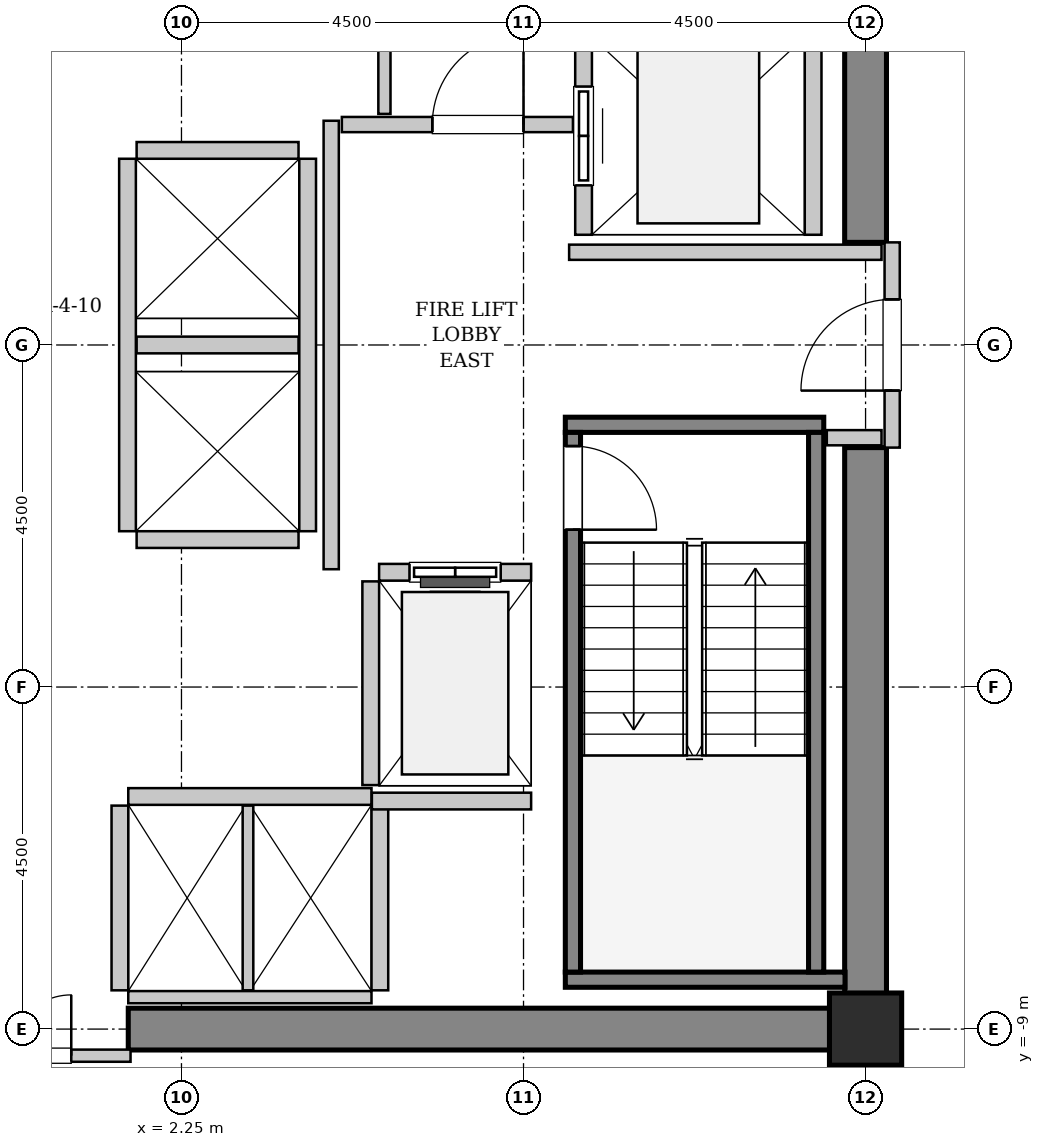
"""IFC4 building model, lengths in metres.
Left out: names, types, materials, properties, quantities, classifications, styles, units other than length and angle.
Written with IfcOpenShell. Run it as: python <this file> out.ifc"""

import sys

from ifc_helpers import new_model, si_unit, direction, frame, frame_2d, origin, origin_2d, place, context, subcontext, project, spatial, rectangle, hollow_rectangle, extrude, source, transform, mapped, element, fill, save


model = new_model("IFC4")
c1 = context("Model", 3, precision=1e-05, world=origin(), true_north=direction((0.0, 1.0)))
c2 = subcontext(c1, "Body", "Model", "MODEL_VIEW")
j1 = project(units=[si_unit("LENGTHUNIT", "METRE"), si_unit("PLANEANGLEUNIT", "RADIAN")], contexts=[c1])
p1 = place(None, origin())
s1 = spatial("IfcSite", under=j1, at=p1, CompositionType="ELEMENT")
p2 = place(p1, origin())
s2 = spatial("IfcBuilding", under=s1, at=p2, CompositionType="ELEMENT")
p3 = place(p2, frame((0.0, 0.0, 98.4)))
s3 = spatial("IfcBuildingStorey", under=s2, at=p3, CompositionType="ELEMENT", Elevation=98.4)
m1 = source(origin(), c2, "Body", "SweptSolid", [
    extrude(rectangle(XDim=9.975, YDim=0.55, at=frame_2d((4.987, 0.0))), origin(), (0.0, 0.0, 1.0), 3.8),
])
p4 = place(p3, frame((1.55, -9.0, 0.0), z_axis=(0.0, 0.0, 1.0), x_axis=(1.0, 0.0, 0.0)))
e1 = element("IfcWall", 1, at=p4, inside=s3, PredefinedType="SHEAR", context=c2, shape_type="MappedRepresentation", body=[
    mapped(m1, transform((0.0, 0.0, 0.0), x_axis=(1.0, 0.0, 0.0), y_axis=(0.0, 1.0, 0.0), z_axis=(0.0, 0.0, 1.0), scale=1.0)),
])
m2 = source(origin(), c2, "Body", "SweptSolid", [
    extrude(rectangle(XDim=7.375, YDim=0.55, at=frame_2d((3.688, 0.0))), origin(), (0.0, 0.0, 1.0), 3.8),
])
for number, where, z_axis, x_axis in (
    (2, (11.25, -8.725, 0.0), (0.0, 0.0, 1.0), (0.0, 1.0, 0.0)),
    (3, (11.25, 1.35, 0.0), (0.0, 0.0, 1.0), (0.0, 1.0, 0.0)),
):
    element("IfcWall", number, at=place(p3, frame(where, z_axis=z_axis, x_axis=x_axis)), inside=s3, PredefinedType="SHEAR", context=c2, shape_type="MappedRepresentation", body=[
        mapped(m2, transform((0.0, 0.0, 0.0), x_axis=(1.0, 0.0, 0.0), y_axis=(0.0, 1.0, 0.0), z_axis=(0.0, 0.0, 1.0), scale=1.0)),
    ])
m3 = source(origin(), c2, "Body", "SweptSolid", [
    extrude(hollow_rectangle(XDim=0.95, YDim=0.95, WallThickness=0.045, InnerFilletRadius=0.045, OuterFilletRadius=0.09, at=origin_2d()), origin(), (0.0, 0.0, 1.0), 3.8),
])
p5 = place(p3, frame((11.25, -9.0, 0.0), z_axis=(0.0, 0.0, 1.0), x_axis=(1.0, 0.0, 0.0)))
e4 = element("IfcColumn", 4, at=p5, inside=s3, PredefinedType="COLUMN", context=c2, shape_type="MappedRepresentation", body=[
    mapped(m3, transform((0.0, 0.0, 0.0), x_axis=(1.0, 0.0, 0.0), y_axis=(0.0, 1.0, 0.0), z_axis=(0.0, 0.0, 1.0), scale=1.0)),
])
m4 = source(origin(), c2, "Body", "SweptSolid", [
    extrude(rectangle(XDim=3.4, YDim=0.2, at=frame_2d((1.7, 0.0))), origin(), (0.0, 0.0, 1.0), 3.8),
])
p6 = place(p3, frame((7.3, -1.05, 0.0), z_axis=(0.0, 0.0, 1.0), x_axis=(1.0, 0.0, 0.0)))
e5 = element("IfcWall", 5, at=p6, inside=s3, PredefinedType="SOLIDWALL", context=c2, shape_type="MappedRepresentation", body=[
    mapped(m4, transform((0.0, 0.0, 0.0), x_axis=(1.0, 0.0, 0.0), y_axis=(0.0, 1.0, 0.0), z_axis=(0.0, 0.0, 1.0), scale=1.0)),
])
m5 = source(origin(), c2, "Body", "SweptSolid", [
    extrude(rectangle(XDim=3.68, YDim=0.2, at=frame_2d((1.84, 0.0))), origin(), (0.0, 0.0, 1.0), 3.8),
])
p7 = place(p3, frame((7.3, -8.35, 0.0), z_axis=(0.0, 0.0, 1.0), x_axis=(1.0, 0.0, 0.0)))
e6 = element("IfcWall", 6, at=p7, inside=s3, PredefinedType="SOLIDWALL", context=c2, shape_type="MappedRepresentation", body=[
    mapped(m5, transform((0.0, 0.0, 0.0), x_axis=(1.0, 0.0, 0.0), y_axis=(0.0, 1.0, 0.0), z_axis=(0.0, 0.0, 1.0), scale=1.0)),
])
m6 = source(origin(), c2, "Body", "SweptSolid", [
    extrude(rectangle(XDim=7.1, YDim=0.2, at=frame_2d((3.55, 0.0))), origin(), (0.0, 0.0, 1.0), 3.8),
])
p8 = place(p3, frame((7.4, -1.15, 0.0), z_axis=(0.0, 0.0, 1.0), x_axis=(0.0, -1.0, 0.0)))
e7 = element("IfcWall", 7, at=p8, inside=s3, PredefinedType="SOLIDWALL", context=c2, shape_type="MappedRepresentation", body=[
    mapped(m6, transform((0.0, 0.0, 0.0), x_axis=(1.0, 0.0, 0.0), y_axis=(0.0, 1.0, 0.0), z_axis=(0.0, 0.0, 1.0), scale=1.0)),
])
p9 = place(p8, frame((0.18, 0.0, 0.0)))
e8 = element("IfcOpeningElement", 8, at=p9, cuts=e7, PredefinedType="OPENING", context=c2, shape_type="SweptSolid", body=[
    extrude(rectangle(XDim=1.1, YDim=2.15, at=frame_2d((0.55, 1.075))), frame((0.0, 0.11, 0.0), z_axis=(0.0, -1.0, 0.0), x_axis=(1.0, 0.0, 0.0)), (0.0, 0.0, 1.0), 0.22),
])
p10 = place(p3, frame((10.6, -1.15, 0.0), z_axis=(0.0, 0.0, 1.0), x_axis=(0.0, -1.0, 0.0)))
e9 = element("IfcWall", 9, at=p10, inside=s3, PredefinedType="SOLIDWALL", context=c2, shape_type="MappedRepresentation", body=[
    mapped(m6, transform((0.0, 0.0, 0.0), x_axis=(1.0, 0.0, 0.0), y_axis=(0.0, 1.0, 0.0), z_axis=(0.0, 0.0, 1.0), scale=1.0)),
])
m7 = source(origin(), c2, "Body", "SweptSolid", [
    extrude(rectangle(XDim=2.0, YDim=0.22, at=frame_2d((1.0, 0.0))), origin(), (0.0, 0.0, 1.0), 3.535),
])
p11 = place(p3, frame((6.85, -2.99, 0.0), z_axis=(0.0, 0.0, 1.0), x_axis=(-1.0, 0.0, 0.0)))
e10 = element("IfcWall", 10, at=p11, inside=s3, PredefinedType="SOLIDWALL", context=c2, shape_type="MappedRepresentation", body=[
    mapped(m7, transform((0.0, 0.0, 0.0), x_axis=(1.0, 0.0, 0.0), y_axis=(0.0, 1.0, 0.0), z_axis=(0.0, 0.0, 1.0), scale=1.0)),
])
p12 = place(p11, frame((0.4, 0.0, 0.0)))
e11 = element("IfcOpeningElement", 11, at=p12, cuts=e10, PredefinedType="OPENING", context=c2, shape_type="SweptSolid", body=[
    extrude(rectangle(XDim=1.2, YDim=2.2, at=frame_2d((0.6, 1.1))), frame((0.0, 0.12, 0.0), z_axis=(0.0, -1.0, 0.0), x_axis=(1.0, 0.0, 0.0)), (0.0, 0.0, 1.0), 0.24),
])
m8 = source(origin(), c2, "Body", "SweptSolid", [
    extrude(rectangle(XDim=2.68, YDim=0.22, at=frame_2d((1.34, 0.0))), origin(), (0.0, 0.0, 1.0), 3.535),
])
p13 = place(p3, frame((4.74, -3.11, 0.0), z_axis=(0.0, 0.0, 1.0), x_axis=(0.0, -1.0, 0.0)))
e12 = element("IfcWall", 12, at=p13, inside=s3, PredefinedType="SOLIDWALL", context=c2, shape_type="MappedRepresentation", body=[
    mapped(m8, transform((0.0, 0.0, 0.0), x_axis=(1.0, 0.0, 0.0), y_axis=(0.0, 1.0, 0.0), z_axis=(0.0, 0.0, 1.0), scale=1.0)),
])
m9 = source(origin(), c2, "Body", "SweptSolid", [
    extrude(rectangle(XDim=5.45, YDim=0.22, at=frame_2d((2.725, 0.0))), origin(), (0.0, 0.0, 1.0), 3.535),
])
p14 = place(p3, frame((7.54, 6.9, 0.0), z_axis=(0.0, 0.0, 1.0), x_axis=(0.0, -1.0, 0.0)))
e13 = element("IfcWall", 13, at=p14, inside=s3, PredefinedType="SOLIDWALL", context=c2, shape_type="MappedRepresentation", body=[
    mapped(m9, transform((0.0, 0.0, 0.0), x_axis=(1.0, 0.0, 0.0), y_axis=(0.0, 1.0, 0.0), z_axis=(0.0, 0.0, 1.0), scale=1.0)),
])
p15 = place(p14, frame((3.5, 0.0, 0.0)))
e14 = element("IfcOpeningElement", 14, at=p15, cuts=e13, PredefinedType="OPENING", context=c2, shape_type="SweptSolid", body=[
    extrude(rectangle(XDim=1.3, YDim=2.3, at=frame_2d((0.65, 1.15))), frame((0.0, 0.12, 0.0), z_axis=(0.0, -1.0, 0.0), x_axis=(1.0, 0.0, 0.0)), (0.0, 0.0, 1.0), 0.24),
])
p16 = place(p14, frame((0.65, 0.0, 0.0)))
e15 = element("IfcOpeningElement", 15, at=p16, cuts=e13, PredefinedType="OPENING", context=c2, shape_type="SweptSolid", body=[
    extrude(rectangle(XDim=1.3, YDim=2.3, at=frame_2d((0.65, 1.15))), frame((0.0, 0.12, 0.0), z_axis=(0.0, -1.0, 0.0), x_axis=(1.0, 0.0, 0.0)), (0.0, 0.0, 1.0), 0.24),
])
p17 = place(p3, frame((10.56, 1.45, 0.0), z_axis=(0.0, 0.0, 1.0), x_axis=(0.0, 1.0, 0.0)))
e16 = element("IfcWall", 16, at=p17, inside=s3, PredefinedType="SOLIDWALL", context=c2, shape_type="MappedRepresentation", body=[
    mapped(m9, transform((0.0, 0.0, 0.0), x_axis=(1.0, 0.0, 0.0), y_axis=(0.0, 1.0, 0.0), z_axis=(0.0, 0.0, 1.0), scale=1.0)),
])
m10 = source(origin(), c2, "Body", "SweptSolid", [
    extrude(rectangle(XDim=3.2, YDim=0.22, at=frame_2d((1.6, 0.0))), origin(), (0.0, 0.0, 1.0), 3.535),
])
p18 = place(p3, frame((4.75, -5.94, 0.0), z_axis=(0.0, 0.0, 1.0), x_axis=(-1.0, 0.0, 0.0)))
e17 = element("IfcWall", 17, at=p18, inside=s3, PredefinedType="SOLIDWALL", context=c2, shape_type="MappedRepresentation", body=[
    mapped(m10, transform((0.0, 0.0, 0.0), x_axis=(1.0, 0.0, 0.0), y_axis=(0.0, 1.0, 0.0), z_axis=(0.0, 0.0, 1.0), scale=1.0)),
])
m11 = source(origin(), c2, "Body", "SweptSolid", [
    extrude(rectangle(XDim=3.2, YDim=0.16, at=frame_2d((1.6, 0.0))), origin(), (0.0, 0.0, 1.0), 2.425),
])
p19 = place(p3, frame((1.55, -8.58, 0.0), z_axis=(0.0, 0.0, 1.0), x_axis=(1.0, 0.0, 0.0)))
e18 = element("IfcWall", 18, at=p19, inside=s3, PredefinedType="PARTITIONING", context=c2, shape_type="MappedRepresentation", body=[
    mapped(m11, transform((0.0, 0.0, 0.0), x_axis=(1.0, 0.0, 0.0), y_axis=(0.0, 1.0, 0.0), z_axis=(0.0, 0.0, 1.0), scale=1.0)),
])
m12 = source(origin(), c2, "Body", "SweptSolid", [
    extrude(rectangle(XDim=2.43, YDim=0.22, at=frame_2d((1.215, 0.0))), origin(), (0.0, 0.0, 1.0), 3.535),
])
p20 = place(p3, frame((1.44, -6.06, 0.0), z_axis=(0.0, 0.0, 1.0), x_axis=(0.0, -1.0, 0.0)))
e19 = element("IfcWall", 19, at=p20, inside=s3, PredefinedType="SOLIDWALL", context=c2, shape_type="MappedRepresentation", body=[
    mapped(m12, transform((0.0, 0.0, 0.0), x_axis=(1.0, 0.0, 0.0), y_axis=(0.0, 1.0, 0.0), z_axis=(0.0, 0.0, 1.0), scale=1.0)),
])
m13 = source(origin(), c2, "Body", "SweptSolid", [
    extrude(rectangle(XDim=2.43, YDim=0.14, at=frame_2d((1.215, 0.0))), origin(), (0.0, 0.0, 1.0), 3.535),
])
p21 = place(p3, frame((3.125, -8.49, 0.0), z_axis=(0.0, 0.0, 1.0), x_axis=(0.0, 1.0, 0.0)))
e20 = element("IfcWall", 20, at=p21, inside=s3, PredefinedType="PARTITIONING", context=c2, shape_type="MappedRepresentation", body=[
    mapped(m13, transform((0.0, 0.0, 0.0), x_axis=(1.0, 0.0, 0.0), y_axis=(0.0, 1.0, 0.0), z_axis=(0.0, 0.0, 1.0), scale=1.0)),
])
p22 = place(p3, frame((4.86, -8.49, 0.0), z_axis=(0.0, 0.0, 1.0), x_axis=(0.0, 1.0, 0.0)))
e21 = element("IfcWall", 21, at=p22, inside=s3, PredefinedType="SOLIDWALL", context=c2, shape_type="MappedRepresentation", body=[
    mapped(m12, transform((0.0, 0.0, 0.0), x_axis=(1.0, 0.0, 0.0), y_axis=(0.0, 1.0, 0.0), z_axis=(0.0, 0.0, 1.0), scale=1.0)),
])
m14 = source(origin(), c2, "Body", "SweptSolid", [
    extrude(rectangle(XDim=4.9, YDim=0.22, at=frame_2d((2.45, 0.0))), origin(), (0.0, 0.0, 1.0), 3.535),
])
for number, where, z_axis, x_axis in (
    (22, (1.54, 2.45, 0.0), (0.0, 0.0, 1.0), (0.0, -1.0, 0.0)),
    (23, (3.91, -2.45, 0.0), (0.0, 0.0, 1.0), (0.0, 1.0, 0.0)),
):
    element("IfcWall", number, at=place(p3, frame(where, z_axis=z_axis, x_axis=x_axis)), inside=s3, PredefinedType="SOLIDWALL", context=c2, shape_type="MappedRepresentation", body=[
        mapped(m14, transform((0.0, 0.0, 0.0), x_axis=(1.0, 0.0, 0.0), y_axis=(0.0, 1.0, 0.0), z_axis=(0.0, 0.0, 1.0), scale=1.0)),
    ])
m15 = source(origin(), c2, "Body", "SweptSolid", [
    extrude(rectangle(XDim=2.13, YDim=0.22, at=frame_2d((1.065, 0.0))), origin(), (0.0, 0.0, 1.0), 3.535),
])
for number, where, z_axis, x_axis in (
    (24, (1.66, -2.56, 0.0), (0.0, 0.0, 1.0), (1.0, 0.0, 0.0)),
    (25, (1.66, 0.0, 0.0), (0.0, 0.0, 1.0), (1.0, 0.0, 0.0)),
    (26, (3.79, 2.56, 0.0), (0.0, 0.0, 1.0), (-1.0, 0.0, 0.0)),
):
    element("IfcWall", number, at=place(p3, frame(where, z_axis=z_axis, x_axis=x_axis)), inside=s3, PredefinedType="SOLIDWALL", context=c2, shape_type="MappedRepresentation", body=[
        mapped(m15, transform((0.0, 0.0, 0.0), x_axis=(1.0, 0.0, 0.0), y_axis=(0.0, 1.0, 0.0), z_axis=(0.0, 0.0, 1.0), scale=1.0)),
    ])
m16 = source(origin(), c2, "Body", "SweptSolid", [
    extrude(rectangle(XDim=2.095, YDim=0.22, at=frame_2d((1.048, 0.0))), origin(), (0.0, 0.0, 1.0), 3.535),
])
p23 = place(p3, frame((4.755, -6.0, 0.0), z_axis=(0.0, 0.0, 1.0), x_axis=(1.0, 0.0, 0.0)))
e27 = element("IfcWall", 27, at=p23, inside=s3, PredefinedType="SOLIDWALL", context=c2, shape_type="MappedRepresentation", body=[
    mapped(m16, transform((0.0, 0.0, 0.0), x_axis=(1.0, 0.0, 0.0), y_axis=(0.0, 1.0, 0.0), z_axis=(0.0, 0.0, 1.0), scale=1.0)),
])
m17 = source(origin(), c2, "Body", "SweptSolid", [
    extrude(rectangle(XDim=2.7, YDim=0.2, at=frame_2d((1.35, 0.0))), origin(), (0.0, 0.0, 1.0), 2.425),
])
p24 = place(p3, frame((11.6, -1.35, 0.0), z_axis=(0.0, 0.0, 1.0), x_axis=(0.0, 1.0, 0.0)))
e28 = element("IfcWall", 28, at=p24, inside=s3, PredefinedType="PARTITIONING", context=c2, shape_type="MappedRepresentation", body=[
    mapped(m17, transform((0.0, 0.0, 0.0), x_axis=(1.0, 0.0, 0.0), y_axis=(0.0, 1.0, 0.0), z_axis=(0.0, 0.0, 1.0), scale=1.0)),
])
p25 = place(p24, frame((0.75, 0.0, 0.0)))
e29 = element("IfcOpeningElement", 29, at=p25, cuts=e28, PredefinedType="OPENING", context=c2, shape_type="SweptSolid", body=[
    extrude(rectangle(XDim=1.2, YDim=2.15, at=frame_2d((0.6, 1.075))), frame((0.0, 0.11, 0.0), z_axis=(0.0, -1.0, 0.0), x_axis=(1.0, 0.0, 0.0)), (0.0, 0.0, 1.0), 0.22),
])
m18 = source(origin(), c2, "Body", "SweptSolid", [
    extrude(rectangle(XDim=5.9, YDim=0.2, at=frame_2d((2.95, 0.0))), origin(), (0.0, 0.0, 1.0), 3.535),
])
p26 = place(p3, frame((4.22, -2.95, 0.0), z_axis=(0.0, 0.0, 1.0), x_axis=(0.0, 1.0, 0.0)))
e30 = element("IfcWall", 30, at=p26, inside=s3, PredefinedType="PARTITIONING", context=c2, shape_type="MappedRepresentation", body=[
    mapped(m18, transform((0.0, 0.0, 0.0), x_axis=(1.0, 0.0, 0.0), y_axis=(0.0, 1.0, 0.0), z_axis=(0.0, 0.0, 1.0), scale=1.0)),
])
m19 = source(origin(), c2, "Body", "SweptSolid", [
    extrude(rectangle(XDim=3.04, YDim=0.2, at=frame_2d((1.52, 0.0))), origin(), (0.0, 0.0, 1.0), 3.535),
])
p27 = place(p3, frame((4.36, 2.9, 0.0), z_axis=(0.0, 0.0, 1.0), x_axis=(1.0, 0.0, 0.0)))
e31 = element("IfcWall", 31, at=p27, inside=s3, PredefinedType="PARTITIONING", context=c2, shape_type="MappedRepresentation", body=[
    mapped(m19, transform((0.0, 0.0, 0.0), x_axis=(1.0, 0.0, 0.0), y_axis=(0.0, 1.0, 0.0), z_axis=(0.0, 0.0, 1.0), scale=1.0)),
])
p28 = place(p27, frame((1.19, 0.0, 0.0)))
e32 = element("IfcOpeningElement", 32, at=p28, cuts=e31, PredefinedType="OPENING", context=c2, shape_type="SweptSolid", body=[
    extrude(rectangle(XDim=1.2, YDim=2.15, at=frame_2d((0.6, 1.075))), frame((0.0, 0.11, 0.0), z_axis=(0.0, -1.0, 0.0), x_axis=(1.0, 0.0, 0.0)), (0.0, 0.0, 1.0), 0.22),
])
m20 = source(origin(), c2, "Body", "SweptSolid", [
    extrude(rectangle(XDim=4.11, YDim=0.2, at=frame_2d((2.055, 0.0))), origin(), (0.0, 0.0, 1.0), 3.535),
])
p29 = place(p3, frame((7.35, 1.22, 0.0), z_axis=(0.0, 0.0, 1.0), x_axis=(1.0, 0.0, 0.0)))
e33 = element("IfcWall", 33, at=p29, inside=s3, PredefinedType="PARTITIONING", context=c2, shape_type="MappedRepresentation", body=[
    mapped(m20, transform((0.0, 0.0, 0.0), x_axis=(1.0, 0.0, 0.0), y_axis=(0.0, 1.0, 0.0), z_axis=(0.0, 0.0, 1.0), scale=1.0)),
])
m21 = source(origin(), c2, "Body", "SweptSolid", [
    extrude(rectangle(XDim=0.72, YDim=0.2, at=frame_2d((0.36, 0.0))), origin(), (0.0, 0.0, 1.0), 3.535),
])
p30 = place(p3, frame((10.74, -1.22, 0.0), z_axis=(0.0, 0.0, 1.0), x_axis=(1.0, 0.0, 0.0)))
e34 = element("IfcWall", 34, at=p30, inside=s3, PredefinedType="PARTITIONING", context=c2, shape_type="MappedRepresentation", body=[
    mapped(m21, transform((0.0, 0.0, 0.0), x_axis=(1.0, 0.0, 0.0), y_axis=(0.0, 1.0, 0.0), z_axis=(0.0, 0.0, 1.0), scale=1.0)),
])
m22 = source(origin(), c2, "Body", "SweptSolid", [
    extrude(rectangle(XDim=3.16, YDim=0.16, at=frame_2d((1.58, 0.0))), origin(), (0.0, 0.0, 1.0), 2.425),
])
p31 = place(p3, frame((-1.58, -9.35, 0.0), z_axis=(0.0, 0.0, 1.0), x_axis=(1.0, 0.0, 0.0)))
e35 = element("IfcWall", 35, at=p31, inside=s3, PredefinedType="PARTITIONING", context=c2, shape_type="MappedRepresentation", body=[
    mapped(m22, transform((0.0, 0.0, 0.0), x_axis=(1.0, 0.0, 0.0), y_axis=(0.0, 1.0, 0.0), z_axis=(0.0, 0.0, 1.0), scale=1.0)),
])
p32 = place(p31, frame((0.78, 0.0, 0.0)))
e36 = element("IfcOpeningElement", 36, at=p32, cuts=e35, PredefinedType="OPENING", context=c2, shape_type="SweptSolid", body=[
    extrude(rectangle(XDim=1.6, YDim=2.3, at=frame_2d((0.8, 1.15))), frame((0.0, 0.09, 0.0), z_axis=(0.0, -1.0, 0.0), x_axis=(1.0, 0.0, 0.0)), (0.0, 0.0, 1.0), 0.18),
])
m23 = source(origin(), c2, "Body", "SweptSolid", [
    extrude(rectangle(XDim=3.015, YDim=0.16, at=frame_2d((1.507, 0.0))), origin(), (0.0, 0.0, 1.0), 3.535),
])
p33 = place(p3, frame((4.92, 3.04, 0.0), z_axis=(0.0, 0.0, 1.0), x_axis=(0.0, 1.0, 0.0)))
e37 = element("IfcWall", 37, at=p33, inside=s3, PredefinedType="PARTITIONING", context=c2, shape_type="MappedRepresentation", body=[
    mapped(m23, transform((0.0, 0.0, 0.0), x_axis=(1.0, 0.0, 0.0), y_axis=(0.0, 1.0, 0.0), z_axis=(0.0, 0.0, 1.0), scale=1.0)),
])
m24 = source(origin(), c2, "Body", "SweptSolid", [
    extrude(rectangle(XDim=1.1, YDim=2.15, at=frame_2d((0.55, 1.075))), frame((0.0, 0.025, 0.0), z_axis=(0.0, -1.0, 0.0), x_axis=(1.0, 0.0, 0.0)), (0.0, 0.0, 1.0), 0.05),
])
p34 = place(p9, origin())
e38 = element("IfcDoor", 38, at=p34, inside=s3, OperationType="SINGLE_SWING_RIGHT", PredefinedType="DOOR", context=c2, shape_type="MappedRepresentation", body=[
    mapped(m24, transform((0.0, 0.0, 0.0), x_axis=(1.0, 0.0, 0.0), y_axis=(0.0, 1.0, 0.0), z_axis=(0.0, 0.0, 1.0), scale=1.0)),
])
fill(e8, e38)
m25 = source(origin(), c2, "Body", "SweptSolid", [
    extrude(rectangle(XDim=1.2, YDim=2.2, at=frame_2d((0.6, 1.1))), frame((0.0, 0.025, 0.0), z_axis=(0.0, -1.0, 0.0), x_axis=(1.0, 0.0, 0.0)), (0.0, 0.0, 1.0), 0.05),
])
p35 = place(p12, origin())
e39 = element("IfcDoor", 39, at=p35, inside=s3, OperationType="SLIDING_TO_LEFT", PredefinedType="DOOR", context=c2, shape_type="MappedRepresentation", body=[
    mapped(m25, transform((0.0, 0.0, 0.0), x_axis=(1.0, 0.0, 0.0), y_axis=(0.0, 1.0, 0.0), z_axis=(0.0, 0.0, 1.0), scale=1.0)),
])
fill(e11, e39)
m26 = source(origin(), c2, "Body", "SweptSolid", [
    extrude(rectangle(XDim=1.3, YDim=2.3, at=frame_2d((0.65, 1.15))), frame((0.0, 0.025, 0.0), z_axis=(0.0, -1.0, 0.0), x_axis=(1.0, 0.0, 0.0)), (0.0, 0.0, 1.0), 0.05),
])
p36 = place(p15, origin())
e40 = element("IfcDoor", 40, at=p36, inside=s3, OperationType="SLIDING_TO_RIGHT", PredefinedType="DOOR", context=c2, shape_type="MappedRepresentation", body=[
    mapped(m26, transform((0.0, 0.0, 0.0), x_axis=(1.0, 0.0, 0.0), y_axis=(0.0, 1.0, 0.0), z_axis=(0.0, 0.0, 1.0), scale=1.0)),
])
fill(e14, e40)
m27 = source(origin(), c2, "Body", "SweptSolid", [
    extrude(rectangle(XDim=1.2, YDim=2.15, at=frame_2d((0.6, 1.075))), frame((0.0, 0.025, 0.0), z_axis=(0.0, -1.0, 0.0), x_axis=(1.0, 0.0, 0.0)), (0.0, 0.0, 1.0), 0.05),
])
p37 = place(p25, origin())
e41 = element("IfcDoor", 41, at=p37, inside=s3, OperationType="SINGLE_SWING_LEFT", PredefinedType="DOOR", context=c2, shape_type="MappedRepresentation", body=[
    mapped(m27, transform((0.0, 0.0, 0.0), x_axis=(1.0, 0.0, 0.0), y_axis=(0.0, 1.0, 0.0), z_axis=(0.0, 0.0, 1.0), scale=1.0)),
])
fill(e29, e41)
p38 = place(p28, origin())
e42 = element("IfcDoor", 42, at=p38, inside=s3, OperationType="SINGLE_SWING_RIGHT", PredefinedType="DOOR", context=c2, shape_type="MappedRepresentation", body=[
    mapped(m27, transform((0.0, 0.0, 0.0), x_axis=(1.0, 0.0, 0.0), y_axis=(0.0, 1.0, 0.0), z_axis=(0.0, 0.0, 1.0), scale=1.0)),
])
fill(e32, e42)
m28 = source(origin(), c2, "Body", "SweptSolid", [
    extrude(rectangle(XDim=1.6, YDim=2.3, at=frame_2d((0.8, 1.15))), frame((0.0, 0.025, 0.0), z_axis=(0.0, -1.0, 0.0), x_axis=(1.0, 0.0, 0.0)), (0.0, 0.0, 1.0), 0.05),
])
p39 = place(p32, origin())
e43 = element("IfcDoor", 43, at=p39, inside=s3, OperationType="DOUBLE_DOOR_SINGLE_SWING", PredefinedType="DOOR", context=c2, shape_type="MappedRepresentation", body=[
    mapped(m28, transform((0.0, 0.0, 0.0), x_axis=(1.0, 0.0, 0.0), y_axis=(0.0, 1.0, 0.0), z_axis=(0.0, 0.0, 1.0), scale=1.0)),
])
fill(e36, e43)
save(model, sys.argv[1])
